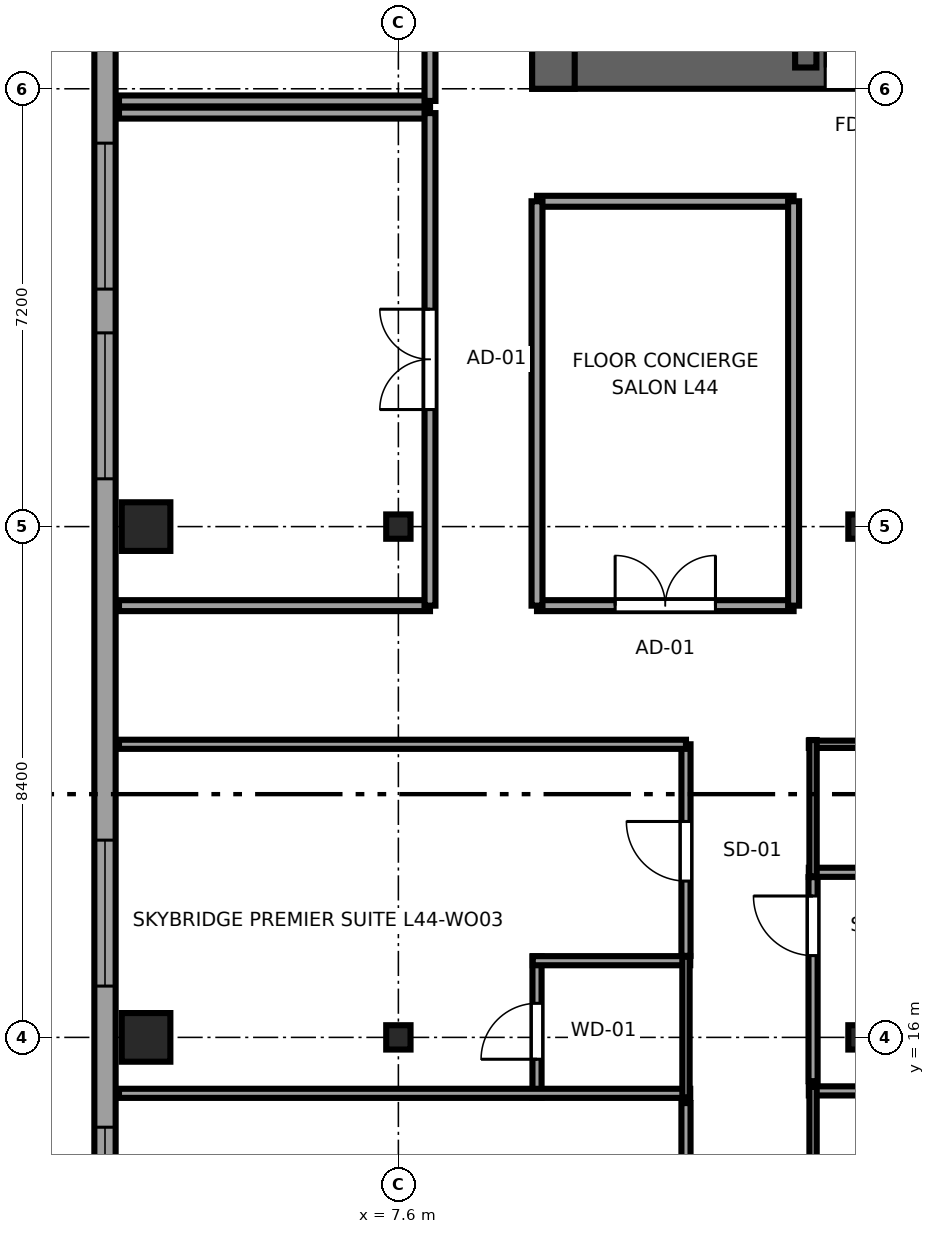
"""IFC4 building model, lengths in metres.
Left out: names, types, materials, properties, quantities, classifications, styles, units other than length and angle.
Written with IfcOpenShell. Run it as: python <this file> out.ifc"""

import sys

from ifc_helpers import new_model, si_unit, direction, frame, frame_2d, origin, origin_2d, place, context, subcontext, project, spatial, rectangle, i_section, extrude, source, transform, mapped, element, fill, save


model = new_model("IFC4")
c1 = context("Model", 3, precision=1e-05, world=origin(), true_north=direction((0.0, 1.0)))
c2 = subcontext(c1, "Body", "Model", "MODEL_VIEW")
j1 = project(units=[si_unit("LENGTHUNIT", "METRE"), si_unit("PLANEANGLEUNIT", "RADIAN")], contexts=[c1])
p1 = place(None, origin())
s1 = spatial("IfcSite", under=j1, at=p1, CompositionType="ELEMENT")
p2 = place(p1, origin())
s2 = spatial("IfcBuilding", under=s1, at=p2, CompositionType="ELEMENT")
p3 = place(p2, frame((0.0, 0.0, 168.35)))
s3 = spatial("IfcBuildingStorey", under=s2, at=p3, CompositionType="ELEMENT", Elevation=168.35)
p4 = place(p3, frame((9.8, 31.95, 0.0), z_axis=(0.0, 0.0, 1.0), x_axis=(1.0, 0.0, 0.0)))
e1 = element("IfcWall", 1, at=p4, inside=s3, PredefinedType="SHEAR", context=c2, shape_type="SweptSolid", body=[
    extrude(rectangle(XDim=26.4, YDim=0.7, at=frame_2d((13.2, 0.0))), origin(), (0.0, 0.0, 1.0), 3.55),
])
p5 = place(p4, frame((6.32, 0.0, 0.0), z_axis=(0.0, 0.0, 1.0), x_axis=(-1.0, 0.0, 0.0)))
e2 = element("IfcOpeningElement", 2, at=p5, cuts=e1, PredefinedType="OPENING", context=c2, shape_type="SweptSolid", body=[
    extrude(rectangle(XDim=1.5, YDim=2.04, at=frame_2d((0.75, 1.02))), frame((0.0, 0.36, 0.0), z_axis=(0.0, -1.0, 0.0), x_axis=(1.0, 0.0, 0.0)), (0.0, 0.0, 1.0), 0.72),
])
p6 = place(p4, frame((13.95, 0.0, 0.0), z_axis=(0.0, 0.0, 1.0), x_axis=(-1.0, 0.0, 0.0)))
e3 = element("IfcOpeningElement", 3, at=p6, cuts=e1, PredefinedType="OPENING", context=c2, shape_type="SweptSolid", body=[
    extrude(rectangle(XDim=1.5, YDim=2.04, at=frame_2d((0.75, 1.02))), frame((0.0, 0.36, 0.0), z_axis=(0.0, -1.0, 0.0), x_axis=(1.0, 0.0, 0.0)), (0.0, 0.0, 1.0), 0.72),
])
p7 = place(p4, frame((21.58, 0.0, 0.0), z_axis=(0.0, 0.0, 1.0), x_axis=(-1.0, 0.0, 0.0)))
e4 = element("IfcOpeningElement", 4, at=p7, cuts=e1, PredefinedType="OPENING", context=c2, shape_type="SweptSolid", body=[
    extrude(rectangle(XDim=1.5, YDim=2.04, at=frame_2d((0.75, 1.02))), frame((0.0, 0.36, 0.0), z_axis=(0.0, -1.0, 0.0), x_axis=(1.0, 0.0, 0.0)), (0.0, 0.0, 1.0), 0.72),
])
p8 = place(p4, frame((8.37, 0.0, 0.0), z_axis=(0.0, 0.0, 1.0), x_axis=(-1.0, 0.0, 0.0)))
e5 = element("IfcOpeningElement", 5, at=p8, cuts=e1, PredefinedType="OPENING", context=c2, shape_type="SweptSolid", body=[
    extrude(rectangle(XDim=0.82, YDim=2.01, at=frame_2d((0.41, 1.005))), frame((0.0, 0.36, 0.0), z_axis=(0.0, -1.0, 0.0), x_axis=(1.0, 0.0, 0.0)), (0.0, 0.0, 1.0), 0.72),
])
p9 = place(p4, frame((18.87, 0.0, 0.0), z_axis=(0.0, 0.0, 1.0), x_axis=(-1.0, 0.0, 0.0)))
e6 = element("IfcOpeningElement", 6, at=p9, cuts=e1, PredefinedType="OPENING", context=c2, shape_type="SweptSolid", body=[
    extrude(rectangle(XDim=0.82, YDim=2.01, at=frame_2d((0.41, 1.005))), frame((0.0, 0.36, 0.0), z_axis=(0.0, -1.0, 0.0), x_axis=(1.0, 0.0, 0.0)), (0.0, 0.0, 1.0), 0.72),
])
p10 = place(p3, frame((10.15, 31.6, 0.0), z_axis=(0.0, 0.0, 1.0), x_axis=(0.0, 1.0, 0.0)))
e7 = element("IfcWall", 7, at=p10, inside=s3, PredefinedType="SHEAR", context=c2, shape_type="SweptSolid", body=[
    extrude(rectangle(XDim=13.6, YDim=0.7, at=frame_2d((6.8, 0.0))), origin(), (0.0, 0.0, 1.0), 3.55),
])
p11 = place(p3, frame((14.3, 31.95, 0.0), z_axis=(0.0, 0.0, 1.0), x_axis=(0.0, 1.0, 0.0)))
e8 = element("IfcWall", 8, at=p11, inside=s3, PredefinedType="SHEAR", context=c2, shape_type="SweptSolid", body=[
    extrude(rectangle(XDim=12.9, YDim=0.35, at=frame_2d((6.45, 0.0))), origin(), (0.0, 0.0, 1.0), 3.55),
])
p12 = place(p11, frame((0.6, 0.0, 0.0)))
e9 = element("IfcOpeningElement", 9, at=p12, cuts=e8, PredefinedType="OPENING", context=c2, shape_type="SweptSolid", body=[
    extrude(rectangle(XDim=1.1, YDim=2.12, at=frame_2d((0.55, 1.06))), frame((0.0, 0.185, 0.0), z_axis=(0.0, -1.0, 0.0), x_axis=(1.0, 0.0, 0.0)), (0.0, 0.0, 1.0), 0.37),
])
m1 = source(origin(), c2, "Body", "SweptSolid", [
    extrude(rectangle(XDim=0.8, YDim=0.8, at=origin_2d()), origin(), (0.0, 0.0, 1.0), 3.55),
])
for number, where, z_axis, x_axis in (
    (10, (3.45, 16.0, 0.0), (0.0, 0.0, 1.0), (1.0, 0.0, 0.0)),
    (11, (3.45, 24.4, 0.0), (0.0, 0.0, 1.0), (1.0, 0.0, 0.0)),
):
    element("IfcColumn", number, at=place(p3, frame(where, z_axis=z_axis, x_axis=x_axis)), inside=s3, PredefinedType="COLUMN", context=c2, shape_type="MappedRepresentation", body=[
        mapped(m1, transform((0.0, 0.0, 0.0), x_axis=(1.0, 0.0, 0.0), y_axis=(0.0, 1.0, 0.0), z_axis=(0.0, 0.0, 1.0), scale=1.0)),
    ])
m2 = source(origin(), c2, "Body", "SweptSolid", [
    extrude(i_section(OverallWidth=0.4, OverallDepth=0.4, WebThickness=0.02, FlangeThickness=0.035, at=origin_2d()), origin(), (0.0, 0.0, 1.0), 3.55),
])
for number, where, z_axis, x_axis in (
    (12, (7.6, 16.0, 0.0), (0.0, 0.0, 1.0), (1.0, 0.0, 0.0)),
    (13, (7.6, 24.4, 0.0), (0.0, 0.0, 1.0), (1.0, 0.0, 0.0)),
    (14, (15.2, 16.0, 0.0), (0.0, 0.0, 1.0), (1.0, 0.0, 0.0)),
    (15, (15.2, 24.4, 0.0), (0.0, 0.0, 1.0), (1.0, 0.0, 0.0)),
):
    element("IfcColumn", number, at=place(p3, frame(where, z_axis=z_axis, x_axis=x_axis)), inside=s3, PredefinedType="COLUMN", context=c2, shape_type="MappedRepresentation", body=[
        mapped(m2, transform((0.0, 0.0, 0.0), x_axis=(1.0, 0.0, 0.0), y_axis=(0.0, 1.0, 0.0), z_axis=(0.0, 0.0, 1.0), scale=1.0)),
    ])
p13 = place(p3, frame((2.775, 41.583, 0.0), z_axis=(0.0, 0.0, 1.0), x_axis=(0.0, -1.0, 0.0)))
e16 = element("IfcWall", 16, at=p13, inside=s3, PredefinedType="SOLIDWALL", context=c2, shape_type="SweptSolid", body=[
    extrude(rectangle(XDim=34.566, YDim=0.35, at=frame_2d((17.283, 0.0))), origin(), (0.0, 0.0, 1.0), 3.37),
])
p14 = place(p13, frame((10.877, 0.0, 0.68)))
e17 = element("IfcOpeningElement", 17, at=p14, cuts=e16, PredefinedType="OPENING", context=c2, shape_type="SweptSolid", body=[
    extrude(rectangle(XDim=2.4, YDim=1.9, at=frame_2d((1.2, 0.95))), frame((0.0, 0.185, 0.0), z_axis=(0.0, -1.0, 0.0), x_axis=(1.0, 0.0, 0.0)), (0.0, 0.0, 1.0), 0.37),
])
p15 = place(p13, frame((13.997, 0.0, 0.68)))
e18 = element("IfcOpeningElement", 18, at=p15, cuts=e16, PredefinedType="OPENING", context=c2, shape_type="SweptSolid", body=[
    extrude(rectangle(XDim=2.4, YDim=1.9, at=frame_2d((1.2, 0.95))), frame((0.0, 0.185, 0.0), z_axis=(0.0, -1.0, 0.0), x_axis=(1.0, 0.0, 0.0)), (0.0, 0.0, 1.0), 0.37),
])
p16 = place(p13, frame((22.339, 0.0, 0.68)))
e19 = element("IfcOpeningElement", 19, at=p16, cuts=e16, PredefinedType="OPENING", context=c2, shape_type="SweptSolid", body=[
    extrude(rectangle(XDim=2.4, YDim=1.9, at=frame_2d((1.2, 0.95))), frame((0.0, 0.185, 0.0), z_axis=(0.0, -1.0, 0.0), x_axis=(1.0, 0.0, 0.0)), (0.0, 0.0, 1.0), 0.37),
])
p17 = place(p13, frame((27.06, 0.0, 0.68)))
e20 = element("IfcOpeningElement", 20, at=p17, cuts=e16, PredefinedType="OPENING", context=c2, shape_type="SweptSolid", body=[
    extrude(rectangle(XDim=2.4, YDim=1.9, at=frame_2d((1.2, 0.95))), frame((0.0, 0.185, 0.0), z_axis=(0.0, -1.0, 0.0), x_axis=(1.0, 0.0, 0.0)), (0.0, 0.0, 1.0), 0.37),
])
p18 = place(p13, frame((6.033, 0.0, 0.62)))
e21 = element("IfcOpeningElement", 21, at=p18, cuts=e16, PredefinedType="OPENING", context=c2, shape_type="SweptSolid", body=[
    extrude(rectangle(XDim=1.5, YDim=1.55, at=frame_2d((0.75, 0.775))), frame((0.0, 0.185, 0.0), z_axis=(0.0, -1.0, 0.0), x_axis=(1.0, 0.0, 0.0)), (0.0, 0.0, 1.0), 0.37),
])
p19 = place(p3, frame((9.88, 15.01, 0.0), z_axis=(0.0, 0.0, 1.0), x_axis=(0.0, 1.0, 0.0)))
e22 = element("IfcWall", 22, at=p19, inside=s3, PredefinedType="PARTITIONING", context=c2, shape_type="SweptSolid", body=[
    extrude(rectangle(XDim=2.321, YDim=0.15, at=frame_2d((1.161, 0.0))), origin(), (0.0, 0.0, 1.0), 3.37),
])
p20 = place(p19, frame((0.631, 0.0, 0.0)))
e23 = element("IfcOpeningElement", 23, at=p20, cuts=e22, PredefinedType="OPENING", context=c2, shape_type="SweptSolid", body=[
    extrude(rectangle(XDim=0.92, YDim=2.01, at=frame_2d((0.46, 1.005))), frame((0.0, 0.085, 0.0), z_axis=(0.0, -1.0, 0.0), x_axis=(1.0, 0.0, 0.0)), (0.0, 0.0, 1.0), 0.17),
])
p21 = place(p3, frame((3.005, 15.08, 0.0), z_axis=(0.0, 0.0, 1.0), x_axis=(1.0, 0.0, 0.0)))
e24 = element("IfcWall", 24, at=p21, inside=s3, PredefinedType="PARTITIONING", context=c2, shape_type="SweptSolid", body=[
    extrude(rectangle(XDim=9.395, YDim=0.15, at=frame_2d((4.698, 0.0))), origin(), (0.0, 0.0, 1.0), 3.37),
])
p22 = place(p3, frame((9.81, 17.261, 0.0), z_axis=(0.0, 0.0, 1.0), x_axis=(1.0, 0.0, 0.0)))
e25 = element("IfcWall", 25, at=p22, inside=s3, PredefinedType="PARTITIONING", context=c2, shape_type="SweptSolid", body=[
    extrude(rectangle(XDim=2.59, YDim=0.15, at=frame_2d((1.295, 0.0))), origin(), (0.0, 0.0, 1.0), 3.37),
])
p23 = place(p3, frame((12.33, 15.01, 0.0), z_axis=(0.0, 0.0, 1.0), x_axis=(0.0, 1.0, 0.0)))
e26 = element("IfcWall", 26, at=p23, inside=s3, PredefinedType="PLUMBINGWALL", context=c2, shape_type="SweptSolid", body=[
    extrude(rectangle(XDim=2.321, YDim=0.12, at=frame_2d((1.161, 0.0))), origin(), (0.0, 0.0, 1.0), 3.37),
])
p24 = place(p3, frame((14.35, 15.12, 0.0), z_axis=(0.0, 0.0, 1.0), x_axis=(1.0, 0.0, 0.0)))
e27 = element("IfcWall", 27, at=p24, inside=s3, PredefinedType="PARTITIONING", context=c2, shape_type="SweptSolid", body=[
    extrude(rectangle(XDim=2.59, YDim=0.15, at=frame_2d((1.295, 0.0))), origin(), (0.0, 0.0, 1.0), 3.37),
])
p25 = place(p3, frame((14.42, 12.983, 0.0), z_axis=(0.0, 0.0, 1.0), x_axis=(0.0, 1.0, 0.0)))
e28 = element("IfcWall", 28, at=p25, inside=s3, PredefinedType="PLUMBINGWALL", context=c2, shape_type="SweptSolid", body=[
    extrude(rectangle(XDim=2.207, YDim=0.12, at=frame_2d((1.104, 0.0))), origin(), (0.0, 0.0, 1.0), 3.37),
])
p26 = place(p3, frame((14.35, 18.715, 0.0), z_axis=(0.0, 0.0, 1.0), x_axis=(1.0, 0.0, 0.0)))
e29 = element("IfcWall", 29, at=p26, inside=s3, PredefinedType="PARTITIONING", context=c2, shape_type="SweptSolid", body=[
    extrude(rectangle(XDim=2.59, YDim=0.15, at=frame_2d((1.295, 0.0))), origin(), (0.0, 0.0, 1.0), 3.37),
])
p27 = place(p3, frame((14.35, 20.82, 0.0), z_axis=(0.0, 0.0, 1.0), x_axis=(1.0, 0.0, 0.0)))
e30 = element("IfcWall", 30, at=p27, inside=s3, PredefinedType="PLUMBINGWALL", context=c2, shape_type="SweptSolid", body=[
    extrude(rectangle(XDim=2.59, YDim=0.12, at=frame_2d((1.295, 0.0))), origin(), (0.0, 0.0, 1.0), 3.37),
])
p28 = place(p3, frame((14.42, 18.645, 0.0), z_axis=(0.0, 0.0, 1.0), x_axis=(0.0, 1.0, 0.0)))
e31 = element("IfcWall", 31, at=p28, inside=s3, PredefinedType="PLUMBINGWALL", context=c2, shape_type="SweptSolid", body=[
    extrude(rectangle(XDim=2.245, YDim=0.12, at=frame_2d((1.123, 0.0))), origin(), (0.0, 0.0, 1.0), 3.37),
])
p29 = place(p3, frame((12.33, 11.379, 0.0), z_axis=(0.0, 0.0, 1.0), x_axis=(0.0, 1.0, 0.0)))
e32 = element("IfcWall", 32, at=p29, inside=s3, PredefinedType="PARTITIONING", context=c2, shape_type="SweptSolid", body=[
    extrude(rectangle(XDim=3.541, YDim=0.15, at=frame_2d((1.771, 0.0))), origin(), (0.0, 0.0, 1.0), 3.37),
])
p30 = place(p29, frame((1.26, 0.0, 0.0)))
e33 = element("IfcOpeningElement", 33, at=p30, cuts=e32, PredefinedType="OPENING", context=c2, shape_type="SweptSolid", body=[
    extrude(rectangle(XDim=0.98, YDim=2.12, at=frame_2d((0.49, 1.06))), frame((0.0, 0.085, 0.0), z_axis=(0.0, -1.0, 0.0), x_axis=(1.0, 0.0, 0.0)), (0.0, 0.0, 1.0), 0.17),
])
p31 = place(p3, frame((12.33, 17.341, 0.0), z_axis=(0.0, 0.0, 1.0), x_axis=(0.0, 1.0, 0.0)))
e34 = element("IfcWall", 34, at=p31, inside=s3, PredefinedType="PARTITIONING", context=c2, shape_type="SweptSolid", body=[
    extrude(rectangle(XDim=3.479, YDim=0.15, at=frame_2d((1.74, 0.0))), origin(), (0.0, 0.0, 1.0), 3.37),
])
p32 = place(p31, frame((1.229, 0.0, 0.0)))
e35 = element("IfcOpeningElement", 35, at=p32, cuts=e34, PredefinedType="OPENING", context=c2, shape_type="SweptSolid", body=[
    extrude(rectangle(XDim=0.98, YDim=2.12, at=frame_2d((0.49, 1.06))), frame((0.0, 0.085, 0.0), z_axis=(0.0, -1.0, 0.0), x_axis=(1.0, 0.0, 0.0)), (0.0, 0.0, 1.0), 0.17),
])
p33 = place(p3, frame((3.005, 20.82, 0.0), z_axis=(0.0, 0.0, 1.0), x_axis=(1.0, 0.0, 0.0)))
e36 = element("IfcWall", 36, at=p33, inside=s3, PredefinedType="PARTITIONING", context=c2, shape_type="SweptSolid", body=[
    extrude(rectangle(XDim=9.325, YDim=0.15, at=frame_2d((4.663, 0.0))), origin(), (0.0, 0.0, 1.0), 3.37),
])
p34 = place(p3, frame((14.42, 15.28, 0.0), z_axis=(0.0, 0.0, 1.0), x_axis=(0.0, 1.0, 0.0)))
e37 = element("IfcWall", 37, at=p34, inside=s3, PredefinedType="PARTITIONING", context=c2, shape_type="SweptSolid", body=[
    extrude(rectangle(XDim=3.355, YDim=0.15, at=frame_2d((1.677, 0.0))), origin(), (0.0, 0.0, 1.0), 3.37),
])
p35 = place(p34, frame((2.065, 0.0, 0.0)))
e38 = element("IfcOpeningElement", 38, at=p35, cuts=e37, PredefinedType="OPENING", context=c2, shape_type="SweptSolid", body=[
    extrude(rectangle(XDim=0.98, YDim=2.12, at=frame_2d((0.49, 1.06))), frame((0.0, 0.085, 0.0), z_axis=(0.0, -1.0, 0.0), x_axis=(1.0, 0.0, 0.0)), (0.0, 0.0, 1.0), 0.17),
])
for number, where, z_axis, x_axis in (
    (39, (3.005, 23.1, 0.0), (0.0, 0.0, 1.0), (1.0, 0.0, 0.0)),
    (40, (3.005, 31.2, 0.0), (0.0, 0.0, 1.0), (1.0, 0.0, 0.0)),
):
    element("IfcWall", number, at=place(p3, frame(where, z_axis=z_axis, x_axis=x_axis)), inside=s3, PredefinedType="PARTITIONING", context=c2, shape_type="SweptSolid", body=[
        extrude(rectangle(XDim=5.115, YDim=0.18, at=frame_2d((2.558, 0.0))), origin(), (0.0, 0.0, 1.0), 3.37),
    ])
p36 = place(p3, frame((8.12, 23.1, 0.0), z_axis=(0.0, 0.0, 1.0), x_axis=(0.0, 1.0, 0.0)))
e41 = element("IfcWall", 41, at=p36, inside=s3, PredefinedType="PARTITIONING", context=c2, shape_type="SweptSolid", body=[
    extrude(rectangle(XDim=8.1, YDim=0.18, at=frame_2d((4.05, 0.0))), origin(), (0.0, 0.0, 1.0), 3.37),
])
p37 = place(p36, frame((3.225, 0.0, 0.0)))
e42 = element("IfcOpeningElement", 42, at=p37, cuts=e41, PredefinedType="OPENING", context=c2, shape_type="SweptSolid", body=[
    extrude(rectangle(XDim=1.65, YDim=2.15, at=frame_2d((0.825, 1.075))), frame((0.0, 0.1, 0.0), z_axis=(0.0, -1.0, 0.0), x_axis=(1.0, 0.0, 0.0)), (0.0, 0.0, 1.0), 0.2),
])
p38 = place(p3, frame((3.005, 31.4, 0.0), z_axis=(0.0, 0.0, 1.0), x_axis=(1.0, 0.0, 0.0)))
e43 = element("IfcWall", 43, at=p38, inside=s3, PredefinedType="PARTITIONING", context=c2, shape_type="SweptSolid", body=[
    extrude(rectangle(XDim=5.115, YDim=0.18, at=frame_2d((2.558, 0.0))), origin(), (0.0, 0.0, 1.0), 3.37),
])
p39 = place(p3, frame((8.12, 31.4, 0.0), z_axis=(0.0, 0.0, 1.0), x_axis=(0.0, 1.0, 0.0)))
e44 = element("IfcWall", 44, at=p39, inside=s3, PredefinedType="PARTITIONING", context=c2, shape_type="SweptSolid", body=[
    extrude(rectangle(XDim=6.8, YDim=0.18, at=frame_2d((3.4, 0.0))), origin(), (0.0, 0.0, 1.0), 3.37),
])
p40 = place(p39, frame((3.175, 0.0, 0.0)))
e45 = element("IfcOpeningElement", 45, at=p40, cuts=e44, PredefinedType="OPENING", context=c2, shape_type="SweptSolid", body=[
    extrude(rectangle(XDim=1.65, YDim=2.15, at=frame_2d((0.825, 1.075))), frame((0.0, 0.1, 0.0), z_axis=(0.0, -1.0, 0.0), x_axis=(1.0, 0.0, 0.0)), (0.0, 0.0, 1.0), 0.2),
])
p41 = place(p3, frame((9.88, 23.1, 0.0), z_axis=(0.0, 0.0, 1.0), x_axis=(1.0, 0.0, 0.0)))
e46 = element("IfcWall", 46, at=p41, inside=s3, PredefinedType="PARTITIONING", context=c2, shape_type="SweptSolid", body=[
    extrude(rectangle(XDim=4.22, YDim=0.18, at=frame_2d((2.11, 0.0))), origin(), (0.0, 0.0, 1.0), 3.37),
])
p42 = place(p41, frame((1.285, 0.0, 0.0)))
e47 = element("IfcOpeningElement", 47, at=p42, cuts=e46, PredefinedType="OPENING", context=c2, shape_type="SweptSolid", body=[
    extrude(rectangle(XDim=1.65, YDim=2.15, at=frame_2d((0.825, 1.075))), frame((0.0, 0.1, 0.0), z_axis=(0.0, -1.0, 0.0), x_axis=(1.0, 0.0, 0.0)), (0.0, 0.0, 1.0), 0.2),
])
p43 = place(p3, frame((9.88, 29.75, 0.0), z_axis=(0.0, 0.0, 1.0), x_axis=(1.0, 0.0, 0.0)))
e48 = element("IfcWall", 48, at=p43, inside=s3, PredefinedType="PARTITIONING", context=c2, shape_type="SweptSolid", body=[
    extrude(rectangle(XDim=4.22, YDim=0.18, at=frame_2d((2.11, 0.0))), origin(), (0.0, 0.0, 1.0), 3.37),
])
for number, where, z_axis, x_axis in (
    (49, (9.88, 23.1, 0.0), (0.0, 0.0, 1.0), (0.0, 1.0, 0.0)),
    (50, (14.1, 23.1, 0.0), (0.0, 0.0, 1.0), (0.0, 1.0, 0.0)),
):
    element("IfcWall", number, at=place(p3, frame(where, z_axis=z_axis, x_axis=x_axis)), inside=s3, PredefinedType="PARTITIONING", context=c2, shape_type="SweptSolid", body=[
        extrude(rectangle(XDim=6.65, YDim=0.18, at=frame_2d((3.325, 0.0))), origin(), (0.0, 0.0, 1.0), 3.37),
    ])
m3 = source(origin(), c2, "Body", "SweptSolid", [
    extrude(rectangle(XDim=2.4, YDim=1.9, at=frame_2d((1.2, 0.95))), frame((0.0, 0.09, 0.0), z_axis=(0.0, -1.0, 0.0), x_axis=(1.0, 0.0, 0.0)), (0.0, 0.0, 1.0), 0.06),
])
p44 = place(p14, origin())
e51 = element("IfcWindow", 51, at=p44, inside=s3, PartitioningType="TRIPLE_PANEL_HORIZONTAL", PredefinedType="WINDOW", context=c2, shape_type="MappedRepresentation", body=[
    mapped(m3, transform((0.0, 0.0, 0.0), x_axis=(1.0, 0.0, 0.0), y_axis=(0.0, 1.0, 0.0), z_axis=(0.0, 0.0, 1.0), scale=1.0)),
])
fill(e17, e51)
p45 = place(p15, origin())
e52 = element("IfcWindow", 52, at=p45, inside=s3, PartitioningType="TRIPLE_PANEL_HORIZONTAL", PredefinedType="WINDOW", context=c2, shape_type="MappedRepresentation", body=[
    mapped(m3, transform((0.0, 0.0, 0.0), x_axis=(1.0, 0.0, 0.0), y_axis=(0.0, 1.0, 0.0), z_axis=(0.0, 0.0, 1.0), scale=1.0)),
])
fill(e18, e52)
p46 = place(p16, origin())
e53 = element("IfcWindow", 53, at=p46, inside=s3, PartitioningType="TRIPLE_PANEL_HORIZONTAL", PredefinedType="WINDOW", context=c2, shape_type="MappedRepresentation", body=[
    mapped(m3, transform((0.0, 0.0, 0.0), x_axis=(1.0, 0.0, 0.0), y_axis=(0.0, 1.0, 0.0), z_axis=(0.0, 0.0, 1.0), scale=1.0)),
])
fill(e19, e53)
p47 = place(p17, origin())
e54 = element("IfcWindow", 54, at=p47, inside=s3, PartitioningType="TRIPLE_PANEL_HORIZONTAL", PredefinedType="WINDOW", context=c2, shape_type="MappedRepresentation", body=[
    mapped(m3, transform((0.0, 0.0, 0.0), x_axis=(1.0, 0.0, 0.0), y_axis=(0.0, 1.0, 0.0), z_axis=(0.0, 0.0, 1.0), scale=1.0)),
])
fill(e20, e54)
m4 = source(origin(), c2, "Body", "SweptSolid", [
    extrude(rectangle(XDim=1.5, YDim=2.04, at=frame_2d((0.75, 1.02))), frame((0.0, 0.025, 0.0), z_axis=(0.0, -1.0, 0.0), x_axis=(1.0, 0.0, 0.0)), (0.0, 0.0, 1.0), 0.05),
])
p48 = place(p5, origin())
e55 = element("IfcDoor", 55, at=p48, inside=s3, OperationType="DOUBLE_DOOR_SINGLE_SWING", PredefinedType="DOOR", context=c2, shape_type="MappedRepresentation", body=[
    mapped(m4, transform((0.0, 0.0, 0.0), x_axis=(1.0, 0.0, 0.0), y_axis=(0.0, 1.0, 0.0), z_axis=(0.0, 0.0, 1.0), scale=1.0)),
])
fill(e2, e55)
m5 = source(origin(), c2, "Body", "SweptSolid", [
    extrude(rectangle(XDim=0.92, YDim=2.01, at=frame_2d((0.46, 1.005))), frame((0.0, 0.025, 0.0), z_axis=(0.0, -1.0, 0.0), x_axis=(1.0, 0.0, 0.0)), (0.0, 0.0, 1.0), 0.05),
])
p49 = place(p20, origin())
e56 = element("IfcDoor", 56, at=p49, inside=s3, OperationType="SINGLE_SWING_LEFT", PredefinedType="DOOR", context=c2, shape_type="MappedRepresentation", body=[
    mapped(m5, transform((0.0, 0.0, 0.0), x_axis=(1.0, 0.0, 0.0), y_axis=(0.0, 1.0, 0.0), z_axis=(0.0, 0.0, 1.0), scale=1.0)),
])
fill(e23, e56)
m6 = source(origin(), c2, "Body", "SweptSolid", [
    extrude(rectangle(XDim=0.98, YDim=2.12, at=frame_2d((0.49, 1.06))), frame((0.0, 0.025, 0.0), z_axis=(0.0, -1.0, 0.0), x_axis=(1.0, 0.0, 0.0)), (0.0, 0.0, 1.0), 0.05),
])
p50 = place(p32, origin())
e57 = element("IfcDoor", 57, at=p50, inside=s3, OperationType="SINGLE_SWING_RIGHT", PredefinedType="DOOR", context=c2, shape_type="MappedRepresentation", body=[
    mapped(m6, transform((0.0, 0.0, 0.0), x_axis=(1.0, 0.0, 0.0), y_axis=(0.0, 1.0, 0.0), z_axis=(0.0, 0.0, 1.0), scale=1.0)),
])
fill(e35, e57)
p51 = place(p35, origin())
e58 = element("IfcDoor", 58, at=p51, inside=s3, OperationType="SINGLE_SWING_RIGHT", PredefinedType="DOOR", context=c2, shape_type="MappedRepresentation", body=[
    mapped(m6, transform((0.0, 0.0, 0.0), x_axis=(1.0, 0.0, 0.0), y_axis=(0.0, 1.0, 0.0), z_axis=(0.0, 0.0, 1.0), scale=1.0)),
])
fill(e38, e58)
m7 = source(origin(), c2, "Body", "SweptSolid", [
    extrude(rectangle(XDim=1.65, YDim=2.15, at=frame_2d((0.825, 1.075))), frame((0.0, 0.025, 0.0), z_axis=(0.0, -1.0, 0.0), x_axis=(1.0, 0.0, 0.0)), (0.0, 0.0, 1.0), 0.05),
])
p52 = place(p37, origin())
e59 = element("IfcDoor", 59, at=p52, inside=s3, OperationType="DOUBLE_DOOR_SINGLE_SWING", PredefinedType="DOOR", context=c2, shape_type="MappedRepresentation", body=[
    mapped(m7, transform((0.0, 0.0, 0.0), x_axis=(1.0, 0.0, 0.0), y_axis=(0.0, 1.0, 0.0), z_axis=(0.0, 0.0, 1.0), scale=1.0)),
])
fill(e42, e59)
p53 = place(p42, origin())
e60 = element("IfcDoor", 60, at=p53, inside=s3, OperationType="DOUBLE_DOOR_SINGLE_SWING", PredefinedType="DOOR", context=c2, shape_type="MappedRepresentation", body=[
    mapped(m7, transform((0.0, 0.0, 0.0), x_axis=(1.0, 0.0, 0.0), y_axis=(0.0, 1.0, 0.0), z_axis=(0.0, 0.0, 1.0), scale=1.0)),
])
fill(e47, e60)
save(model, sys.argv[1])
